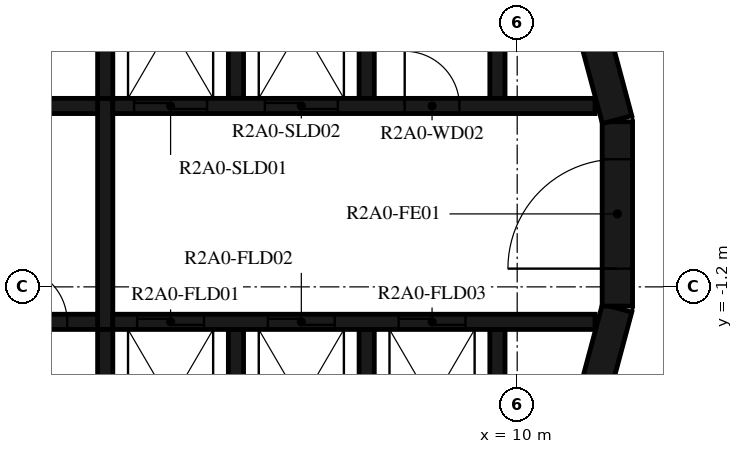
"""IFC4 building model, lengths in metres.
Left out: names, types, materials, properties, quantities, classifications, styles, units other than length and angle.
Written with IfcOpenShell. Run it as: python <this file> out.ifc"""

import sys

from ifc_helpers import new_model, si_unit, direction, frame, frame_2d, origin, place, context, subcontext, project, spatial, polyline, rectangle, outline, extrude, element, fill, save


model = new_model("IFC4")
c1 = context("Model", 3, precision=1e-05, world=origin(), true_north=direction((0.0, 1.0)))
c2 = subcontext(c1, "Body", "Model", "MODEL_VIEW")
j1 = project(units=[si_unit("LENGTHUNIT", "METRE"), si_unit("PLANEANGLEUNIT", "RADIAN")], contexts=[c1])
p1 = place(None, origin())
s1 = spatial("IfcSite", under=j1, at=p1, CompositionType="ELEMENT")
p2 = place(p1, origin())
s2 = spatial("IfcBuilding", under=s1, at=p2, CompositionType="ELEMENT")
p3 = place(p2, frame((0.0, 0.0, 83.7)))
s3 = spatial("IfcBuildingStorey", under=s2, at=p3, CompositionType="ELEMENT", Elevation=83.7)
p4 = place(p3, frame((10.858, -4.479, 0.0), z_axis=(0.0, 0.0, 1.0), x_axis=(0.258734743916, 0.965948410781, 0.0)))
e1 = element("IfcWall", 1, at=p4, inside=s3, PredefinedType="SHEAR", context=c2, shape_type="SweptSolid", body=[
    extrude(rectangle(XDim=3.033, YDim=0.5, at=frame_2d((1.516, 0.0))), origin(), (0.0, 0.0, 1.0), 3.12),
])
p5 = place(p3, frame((11.647, -1.516, 0.0), z_axis=(0.0, 0.0, 1.0), x_axis=(0.0, 1.0, 0.0)))
e2 = element("IfcWall", 2, at=p5, inside=s3, PredefinedType="SHEAR", context=c2, shape_type="SweptSolid", body=[
    extrude(rectangle(XDim=3.033, YDim=0.5, at=frame_2d((1.516, 0.0))), origin(), (0.0, 0.0, 1.0), 3.12),
])
p6 = place(p5, frame((0.616, 0.0, 0.0)))
e3 = element("IfcOpeningElement", 3, at=p6, cuts=e2, PredefinedType="OPENING", context=c2, shape_type="SweptSolid", body=[
    extrude(rectangle(XDim=1.8, YDim=2.1, at=frame_2d((0.9, 1.05))), frame((0.0, 0.26, 0.0), z_axis=(0.0, -1.0, 0.0), x_axis=(1.0, 0.0, 0.0)), (0.0, 0.0, 1.0), 0.52),
])
p7 = place(p3, frame((11.643, 1.55, 0.0), z_axis=(0.0, 0.0, 1.0), x_axis=(-0.258734743916, 0.965948410781, 0.0)))
e4 = element("IfcWall", 4, at=p7, inside=s3, PredefinedType="SHEAR", context=c2, shape_type="SweptSolid", body=[
    extrude(rectangle(XDim=3.033, YDim=0.5, at=frame_2d((1.516, 0.0))), origin(), (0.0, 0.0, 1.0), 3.12),
])
p8 = place(p3, origin())
e5 = element("IfcWall", 5, at=p8, inside=s3, PredefinedType="SHEAR", context=c2, shape_type="SweptSolid", body=[
    extrude(outline(polyline([(-9.55, 4.8), (-7.65, 4.8), (-7.65, 1.9), (-7.4, 1.9), (-7.4, 4.8), (-5.5, 4.8), (-5.5, 1.9), (-5.25, 1.9), (-5.25, 4.8), (-3.35, 4.8), (-3.35, 1.9), (-3.1, 1.9), (-3.1, 4.8), (-1.2, 4.8), (-1.2, 1.9), (-0.95, 1.9), (-0.95, 4.8), (3.1, 4.8), (3.1, 1.9), (3.35, 1.9), (3.35, 4.8), (5.25, 4.8), (5.25, 1.9), (5.5, 1.9), (5.5, 4.8), (7.4, 4.8), (7.4, 1.9), (7.65, 1.9), (7.65, 4.8), (9.55, 4.8), (9.55, 1.9), (9.8, 1.9), (9.8, 4.8), (9.8, 5.05), (-9.8, 5.05), (-9.8, 4.8), (-9.8, 1.9), (-9.55, 1.9), (-9.55, 4.8)])), origin(), (0.0, 0.0, 1.0), 3.12),
])
p9 = place(p3, origin())
e6 = element("IfcWall", 6, at=p9, inside=s3, PredefinedType="SHEAR", context=c2, shape_type="SweptSolid", body=[
    extrude(outline(polyline([(9.8, -5.05), (9.8, -4.8), (9.8, -1.9), (9.55, -1.9), (9.55, -4.8), (7.65, -4.8), (7.65, -1.9), (7.4, -1.9), (7.4, -4.8), (5.5, -4.8), (5.5, -1.9), (5.25, -1.9), (5.25, -4.8), (3.35, -4.8), (3.35, -1.9), (3.1, -1.9), (3.1, -4.8), (1.2, -4.8), (1.2, -1.9), (0.95, -1.9), (0.95, -4.8), (-0.95, -4.8), (-0.95, -1.9), (-1.2, -1.9), (-1.2, -4.8), (-5.25, -4.8), (-5.25, -1.9), (-5.5, -1.9), (-5.5, -4.8), (-7.4, -4.8), (-7.4, -1.9), (-7.65, -1.9), (-7.65, -4.8), (-9.55, -4.8), (-9.55, -1.9), (-9.8, -1.9), (-9.8, -4.8), (-9.8, -5.05), (9.8, -5.05)])), origin(), (0.0, 0.0, 1.0), 3.12),
])
p10 = place(p3, frame((-11.28, 1.775, 0.0), z_axis=(0.0, 0.0, 1.0), x_axis=(1.0, 0.0, 0.0)))
e7 = element("IfcWall", 7, at=p10, inside=s3, PredefinedType="SHEAR", context=c2, shape_type="SweptSolid", body=[
    extrude(rectangle(XDim=14.38, YDim=0.25, at=frame_2d((7.19, 0.0))), origin(), (0.0, 0.0, 1.0), 3.12),
])
p11 = place(p10, frame((2.13, 0.0, 0.0)))
e8 = element("IfcOpeningElement", 8, at=p11, cuts=e7, PredefinedType="OPENING", context=c2, shape_type="SweptSolid", body=[
    extrude(rectangle(XDim=1.1, YDim=2.1, at=frame_2d((0.55, 1.05))), frame((0.0, 0.135, 0.0), z_axis=(0.0, -1.0, 0.0), x_axis=(1.0, 0.0, 0.0)), (0.0, 0.0, 1.0), 0.27),
])
p12 = place(p10, frame((4.28, 0.0, 0.0)))
e9 = element("IfcOpeningElement", 9, at=p12, cuts=e7, PredefinedType="OPENING", context=c2, shape_type="SweptSolid", body=[
    extrude(rectangle(XDim=1.1, YDim=2.1, at=frame_2d((0.55, 1.05))), frame((0.0, 0.135, 0.0), z_axis=(0.0, -1.0, 0.0), x_axis=(1.0, 0.0, 0.0)), (0.0, 0.0, 1.0), 0.27),
])
p13 = place(p10, frame((6.43, 0.0, 0.0)))
e10 = element("IfcOpeningElement", 10, at=p13, cuts=e7, PredefinedType="OPENING", context=c2, shape_type="SweptSolid", body=[
    extrude(rectangle(XDim=1.1, YDim=2.1, at=frame_2d((0.55, 1.05))), frame((0.0, 0.135, 0.0), z_axis=(0.0, -1.0, 0.0), x_axis=(1.0, 0.0, 0.0)), (0.0, 0.0, 1.0), 0.27),
])
p14 = place(p10, frame((8.58, 0.0, 0.0)))
e11 = element("IfcOpeningElement", 11, at=p14, cuts=e7, PredefinedType="OPENING", context=c2, shape_type="SweptSolid", body=[
    extrude(rectangle(XDim=1.1, YDim=2.1, at=frame_2d((0.55, 1.05))), frame((0.0, 0.135, 0.0), z_axis=(0.0, -1.0, 0.0), x_axis=(1.0, 0.0, 0.0)), (0.0, 0.0, 1.0), 0.27),
])
p15 = place(p10, frame((11.905, 0.0, 0.0)))
e12 = element("IfcOpeningElement", 12, at=p15, cuts=e7, PredefinedType="OPENING", context=c2, shape_type="SweptSolid", body=[
    extrude(rectangle(XDim=0.9, YDim=2.1, at=frame_2d((0.45, 1.05))), frame((0.0, 0.135, 0.0), z_axis=(0.0, -1.0, 0.0), x_axis=(1.0, 0.0, 0.0)), (0.0, 0.0, 1.0), 0.27),
])
p16 = place(p3, frame((3.35, 1.775, 0.0), z_axis=(0.0, 0.0, 1.0), x_axis=(1.0, 0.0, 0.0)))
e13 = element("IfcWall", 13, at=p16, inside=s3, PredefinedType="SHEAR", context=c2, shape_type="SweptSolid", body=[
    extrude(rectangle(XDim=7.93, YDim=0.25, at=frame_2d((3.965, 0.0))), origin(), (0.0, 0.0, 1.0), 3.12),
])
p17 = place(p16, frame((0.35, 0.0, 0.0)))
e14 = element("IfcOpeningElement", 14, at=p17, cuts=e13, PredefinedType="OPENING", context=c2, shape_type="SweptSolid", body=[
    extrude(rectangle(XDim=1.2, YDim=2.4, at=frame_2d((0.6, 1.2))), frame((0.0, 0.135, 0.0), z_axis=(0.0, -1.0, 0.0), x_axis=(1.0, 0.0, 0.0)), (0.0, 0.0, 1.0), 0.27),
])
p18 = place(p16, frame((2.5, 0.0, 0.0)))
e15 = element("IfcOpeningElement", 15, at=p18, cuts=e13, PredefinedType="OPENING", context=c2, shape_type="SweptSolid", body=[
    extrude(rectangle(XDim=1.2, YDim=2.4, at=frame_2d((0.6, 1.2))), frame((0.0, 0.135, 0.0), z_axis=(0.0, -1.0, 0.0), x_axis=(1.0, 0.0, 0.0)), (0.0, 0.0, 1.0), 0.27),
])
p19 = place(p16, frame((4.8, 0.0, 0.0)))
e16 = element("IfcOpeningElement", 16, at=p19, cuts=e13, PredefinedType="OPENING", context=c2, shape_type="SweptSolid", body=[
    extrude(rectangle(XDim=0.9, YDim=2.1, at=frame_2d((0.45, 1.05))), frame((0.0, 0.135, 0.0), z_axis=(0.0, -1.0, 0.0), x_axis=(1.0, 0.0, 0.0)), (0.0, 0.0, 1.0), 0.27),
])
p20 = place(p3, frame((-11.28, -1.775, 0.0), z_axis=(0.0, 0.0, 1.0), x_axis=(1.0, 0.0, 0.0)))
e17 = element("IfcWall", 17, at=p20, inside=s3, PredefinedType="SHEAR", context=c2, shape_type="SweptSolid", body=[
    extrude(rectangle(XDim=14.38, YDim=0.25, at=frame_2d((7.19, 0.0))), origin(), (0.0, 0.0, 1.0), 3.12),
])
p21 = place(p20, frame((7.605, 0.0, 0.0)))
e18 = element("IfcOpeningElement", 18, at=p21, cuts=e17, PredefinedType="OPENING", context=c2, shape_type="SweptSolid", body=[
    extrude(rectangle(XDim=0.9, YDim=2.1, at=frame_2d((0.45, 1.05))), frame((0.0, 0.135, 0.0), z_axis=(0.0, -1.0, 0.0), x_axis=(1.0, 0.0, 0.0)), (0.0, 0.0, 1.0), 0.27),
])
p22 = place(p20, frame((10.83, 0.0, 0.0)))
e19 = element("IfcOpeningElement", 19, at=p22, cuts=e17, PredefinedType="OPENING", context=c2, shape_type="SweptSolid", body=[
    extrude(rectangle(XDim=0.9, YDim=2.1, at=frame_2d((0.45, 1.05))), frame((0.0, 0.135, 0.0), z_axis=(0.0, -1.0, 0.0), x_axis=(1.0, 0.0, 0.0)), (0.0, 0.0, 1.0), 0.27),
])
p23 = place(p20, frame((12.98, 0.0, 0.0)))
e20 = element("IfcOpeningElement", 20, at=p23, cuts=e17, PredefinedType="OPENING", context=c2, shape_type="SweptSolid", body=[
    extrude(rectangle(XDim=0.9, YDim=2.1, at=frame_2d((0.45, 1.05))), frame((0.0, 0.135, 0.0), z_axis=(0.0, -1.0, 0.0), x_axis=(1.0, 0.0, 0.0)), (0.0, 0.0, 1.0), 0.27),
])
p24 = place(p3, frame((3.35, -1.775, 0.0), z_axis=(0.0, 0.0, 1.0), x_axis=(1.0, 0.0, 0.0)))
e21 = element("IfcWall", 21, at=p24, inside=s3, PredefinedType="SHEAR", context=c2, shape_type="SweptSolid", body=[
    extrude(rectangle(XDim=7.93, YDim=0.25, at=frame_2d((3.965, 0.0))), origin(), (0.0, 0.0, 1.0), 3.12),
])
p25 = place(p24, frame((0.4, 0.0, 0.0)))
e22 = element("IfcOpeningElement", 22, at=p25, cuts=e21, PredefinedType="OPENING", context=c2, shape_type="SweptSolid", body=[
    extrude(rectangle(XDim=1.1, YDim=2.4, at=frame_2d((0.55, 1.2))), frame((0.0, 0.135, 0.0), z_axis=(0.0, -1.0, 0.0), x_axis=(1.0, 0.0, 0.0)), (0.0, 0.0, 1.0), 0.27),
])
p26 = place(p24, frame((2.55, 0.0, 0.0)))
e23 = element("IfcOpeningElement", 23, at=p26, cuts=e21, PredefinedType="OPENING", context=c2, shape_type="SweptSolid", body=[
    extrude(rectangle(XDim=1.1, YDim=2.4, at=frame_2d((0.55, 1.2))), frame((0.0, 0.135, 0.0), z_axis=(0.0, -1.0, 0.0), x_axis=(1.0, 0.0, 0.0)), (0.0, 0.0, 1.0), 0.27),
])
p27 = place(p24, frame((4.7, 0.0, 0.0)))
e24 = element("IfcOpeningElement", 24, at=p27, cuts=e21, PredefinedType="OPENING", context=c2, shape_type="SweptSolid", body=[
    extrude(rectangle(XDim=1.1, YDim=2.4, at=frame_2d((0.55, 1.2))), frame((0.0, 0.135, 0.0), z_axis=(0.0, -1.0, 0.0), x_axis=(1.0, 0.0, 0.0)), (0.0, 0.0, 1.0), 0.27),
])
p28 = place(p3, frame((3.225, -1.9, 0.0), z_axis=(0.0, 0.0, 1.0), x_axis=(0.0, 1.0, 0.0)))
e25 = element("IfcWall", 25, at=p28, inside=s3, PredefinedType="SHEAR", context=c2, shape_type="SweptSolid", body=[
    extrude(rectangle(XDim=3.8, YDim=0.25, at=frame_2d((1.9, 0.0))), origin(), (0.0, 0.0, 1.0), 3.12),
])
p29 = place(p3, frame((11.1, -8.829, 0.0), z_axis=(0.0, 0.0, 1.0), x_axis=(0.398741918631, 0.917063183388, 0.0)))
e26 = element("IfcWall", 26, at=p29, inside=s3, PredefinedType="STANDARD", context=c2, shape_type="SweptSolid", body=[
    extrude(rectangle(XDim=7.342, YDim=0.2, at=frame_2d((3.671, 0.0))), origin(), (0.0, 0.0, 1.0), 3.12),
])
p30 = place(p6, origin())
e27 = element("IfcDoor", 27, at=p30, inside=s3, OperationType="DOUBLE_DOOR_SINGLE_SWING", PredefinedType="DOOR", context=c2, shape_type="SweptSolid", body=[
    extrude(rectangle(XDim=1.8, YDim=2.1, at=frame_2d((0.9, 1.05))), frame((0.0, 0.025, 0.0), z_axis=(0.0, -1.0, 0.0), x_axis=(1.0, 0.0, 0.0)), (0.0, 0.0, 1.0), 0.05),
])
fill(e3, e27)
p31 = place(p17, origin())
e28 = element("IfcDoor", 28, at=p31, inside=s3, OperationType="DOUBLE_DOOR_SLIDING", PredefinedType="DOOR", context=c2, shape_type="SweptSolid", body=[
    extrude(rectangle(XDim=1.2, YDim=2.4, at=frame_2d((0.6, 1.2))), frame((0.0, 0.025, 0.0), z_axis=(0.0, -1.0, 0.0), x_axis=(1.0, 0.0, 0.0)), (0.0, 0.0, 1.0), 0.05),
])
fill(e14, e28)
p32 = place(p18, origin())
e29 = element("IfcDoor", 29, at=p32, inside=s3, OperationType="DOUBLE_DOOR_SLIDING", PredefinedType="DOOR", context=c2, shape_type="SweptSolid", body=[
    extrude(rectangle(XDim=1.2, YDim=2.4, at=frame_2d((0.6, 1.2))), frame((0.0, 0.025, 0.0), z_axis=(0.0, -1.0, 0.0), x_axis=(1.0, 0.0, 0.0)), (0.0, 0.0, 1.0), 0.05),
])
fill(e15, e29)
p33 = place(p25, origin())
e30 = element("IfcDoor", 30, at=p33, inside=s3, OperationType="DOUBLE_DOOR_SLIDING", PredefinedType="DOOR", context=c2, shape_type="SweptSolid", body=[
    extrude(rectangle(XDim=1.1, YDim=2.4, at=frame_2d((0.55, 1.2))), frame((0.0, 0.025, 0.0), z_axis=(0.0, -1.0, 0.0), x_axis=(1.0, 0.0, 0.0)), (0.0, 0.0, 1.0), 0.05),
])
fill(e22, e30)
p34 = place(p26, origin())
e31 = element("IfcDoor", 31, at=p34, inside=s3, OperationType="DOUBLE_DOOR_SLIDING", PredefinedType="DOOR", context=c2, shape_type="SweptSolid", body=[
    extrude(rectangle(XDim=1.1, YDim=2.4, at=frame_2d((0.55, 1.2))), frame((0.0, 0.025, 0.0), z_axis=(0.0, -1.0, 0.0), x_axis=(1.0, 0.0, 0.0)), (0.0, 0.0, 1.0), 0.05),
])
fill(e23, e31)
p35 = place(p27, origin())
e32 = element("IfcDoor", 32, at=p35, inside=s3, OperationType="DOUBLE_DOOR_SLIDING", PredefinedType="DOOR", context=c2, shape_type="SweptSolid", body=[
    extrude(rectangle(XDim=1.1, YDim=2.4, at=frame_2d((0.55, 1.2))), frame((0.0, 0.025, 0.0), z_axis=(0.0, -1.0, 0.0), x_axis=(1.0, 0.0, 0.0)), (0.0, 0.0, 1.0), 0.05),
])
fill(e24, e32)
p36 = place(p19, origin())
e33 = element("IfcDoor", 33, at=p36, inside=s3, OperationType="SINGLE_SWING_LEFT", PredefinedType="DOOR", context=c2, shape_type="SweptSolid", body=[
    extrude(rectangle(XDim=0.9, YDim=2.1, at=frame_2d((0.45, 1.05))), frame((0.0, 0.025, 0.0), z_axis=(0.0, -1.0, 0.0), x_axis=(1.0, 0.0, 0.0)), (0.0, 0.0, 1.0), 0.05),
])
fill(e16, e33)
p37 = place(p23, origin())
e34 = element("IfcDoor", 34, at=p37, inside=s3, OperationType="SINGLE_SWING_RIGHT", PredefinedType="DOOR", context=c2, shape_type="SweptSolid", body=[
    extrude(rectangle(XDim=0.9, YDim=2.1, at=frame_2d((0.45, 1.05))), frame((0.0, 0.025, 0.0), z_axis=(0.0, -1.0, 0.0), x_axis=(1.0, 0.0, 0.0)), (0.0, 0.0, 1.0), 0.05),
])
fill(e20, e34)
save(model, sys.argv[1])
